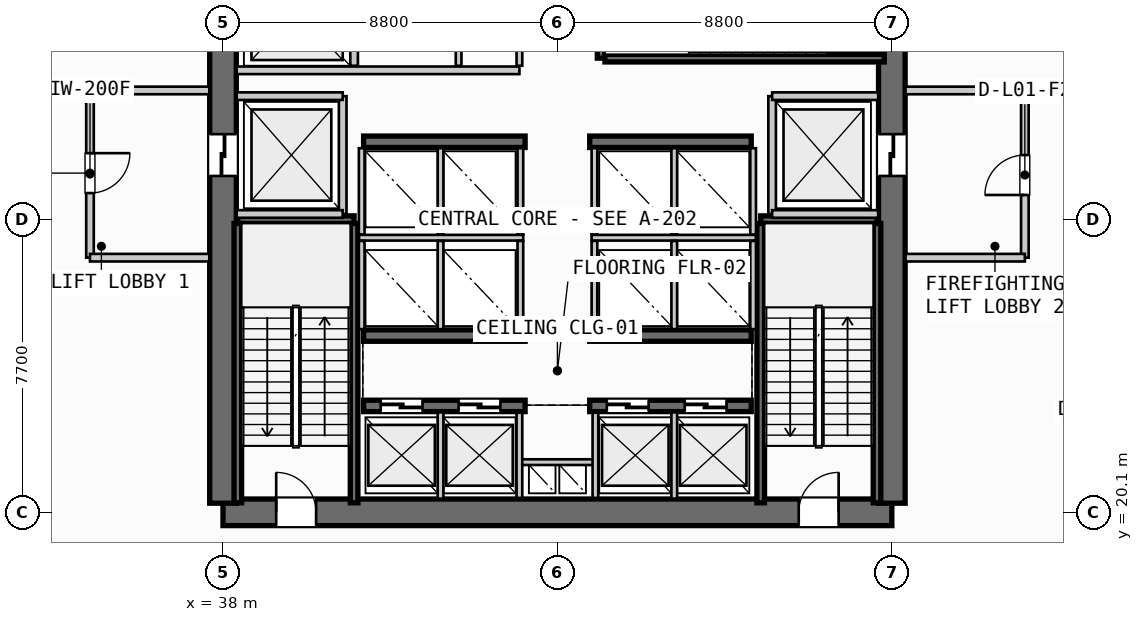
"""IFC4 building model, lengths in metres.
Left out: names, types, materials, properties, quantities, classifications, styles, units other than length and angle.
Written with IfcOpenShell. Run it as: python <this file> out.ifc"""

import sys

from ifc_helpers import new_model, si_unit, direction, frame, frame_2d, origin, place, context, subcontext, project, spatial, rectangle, extrude, source, transform, mapped, element, fill, save


model = new_model("IFC4")
c1 = context("Model", 3, precision=1e-05, world=origin(), true_north=direction((0.0, 1.0)))
c2 = subcontext(c1, "Body", "Model", "MODEL_VIEW")
j1 = project(units=[si_unit("LENGTHUNIT", "METRE"), si_unit("PLANEANGLEUNIT", "RADIAN")], contexts=[c1])
p1 = place(None, origin())
s1 = spatial("IfcSite", under=j1, at=p1, CompositionType="ELEMENT")
p2 = place(p1, origin())
s2 = spatial("IfcBuilding", under=s1, at=p2, CompositionType="ELEMENT")
p3 = place(p2, frame((0.0, 0.0, 5.2)))
s3 = spatial("IfcBuildingStorey", under=s2, at=p3, CompositionType="ELEMENT", Elevation=5.2)
p4 = place(p3, frame((38.0, 20.1, 0.0), z_axis=(0.0, 0.0, 1.0), x_axis=(1.0, 0.0, 0.0)))
e1 = element("IfcWall", 1, at=p4, inside=s3, PredefinedType="SHEAR", context=c2, shape_type="SweptSolid", body=[
    extrude(rectangle(XDim=17.6, YDim=0.7, at=frame_2d((8.8, 0.0))), origin(), (0.0, 0.0, 1.0), 4.55),
])
p5 = place(p4, frame((1.4, 0.0, 0.0)))
e2 = element("IfcOpeningElement", 2, at=p5, cuts=e1, PredefinedType="OPENING", context=c2, shape_type="SweptSolid", body=[
    extrude(rectangle(XDim=1.05, YDim=2.15, at=frame_2d((0.525, 1.075))), frame((0.0, 0.36, 0.0), z_axis=(0.0, -1.0, 0.0), x_axis=(1.0, 0.0, 0.0)), (0.0, 0.0, 1.0), 0.72),
])
p6 = place(p4, frame((15.15, 0.0, 0.0)))
e3 = element("IfcOpeningElement", 3, at=p6, cuts=e1, PredefinedType="OPENING", context=c2, shape_type="SweptSolid", body=[
    extrude(rectangle(XDim=1.05, YDim=2.15, at=frame_2d((0.525, 1.075))), frame((0.0, 0.36, 0.0), z_axis=(0.0, -1.0, 0.0), x_axis=(1.0, 0.0, 0.0)), (0.0, 0.0, 1.0), 0.72),
])
p7 = place(p3, frame((38.0, 35.26, 0.0), z_axis=(0.0, 0.0, 1.0), x_axis=(0.0, -1.0, 0.0)))
e4 = element("IfcWall", 4, at=p7, inside=s3, PredefinedType="SHEAR", context=c2, shape_type="SweptSolid", body=[
    extrude(rectangle(XDim=14.92, YDim=0.7, at=frame_2d((7.46, 0.0))), origin(), (0.0, 0.0, 1.0), 4.55),
])
p8 = place(p7, frame((5.21, 0.0, 0.0)))
e5 = element("IfcOpeningElement", 5, at=p8, cuts=e4, PredefinedType="OPENING", context=c2, shape_type="SweptSolid", body=[
    extrude(rectangle(XDim=1.1, YDim=2.2, at=frame_2d((0.55, 1.1))), frame((0.0, 0.36, 0.0), z_axis=(0.0, -1.0, 0.0), x_axis=(1.0, 0.0, 0.0)), (0.0, 0.0, 1.0), 0.72),
])
p9 = place(p3, frame((55.6, 20.34, 0.0), z_axis=(0.0, 0.0, 1.0), x_axis=(0.0, 1.0, 0.0)))
e6 = element("IfcWall", 6, at=p9, inside=s3, PredefinedType="SHEAR", context=c2, shape_type="SweptSolid", body=[
    extrude(rectangle(XDim=14.92, YDim=0.7, at=frame_2d((7.46, 0.0))), origin(), (0.0, 0.0, 1.0), 4.55),
])
p10 = place(p9, frame((12.71, 0.0, 0.0)))
e7 = element("IfcOpeningElement", 7, at=p10, cuts=e6, PredefinedType="OPENING", context=c2, shape_type="SweptSolid", body=[
    extrude(rectangle(XDim=1.05, YDim=2.15, at=frame_2d((0.525, 1.075))), frame((0.0, 0.36, 0.0), z_axis=(0.0, -1.0, 0.0), x_axis=(1.0, 0.0, 0.0)), (0.0, 0.0, 1.0), 0.72),
])
p11 = place(p9, frame((8.61, 0.0, 0.0)))
e8 = element("IfcOpeningElement", 8, at=p11, cuts=e6, PredefinedType="OPENING", context=c2, shape_type="SweptSolid", body=[
    extrude(rectangle(XDim=1.1, YDim=2.2, at=frame_2d((0.55, 1.1))), frame((0.0, 0.36, 0.0), z_axis=(0.0, -1.0, 0.0), x_axis=(1.0, 0.0, 0.0)), (0.0, 0.0, 1.0), 0.72),
])
p12 = place(p3, frame((41.7, 22.9, 0.0), z_axis=(0.0, 0.0, 1.0), x_axis=(1.0, 0.0, 0.0)))
e9 = element("IfcWall", 9, at=p12, inside=s3, PredefinedType="SHEAR", context=c2, shape_type="SweptSolid", body=[
    extrude(rectangle(XDim=4.25, YDim=0.3, at=frame_2d((2.125, 0.0))), origin(), (0.0, 0.0, 1.0), 4.55),
])
p13 = place(p12, frame((0.45, 0.0, 0.0)))
e10 = element("IfcOpeningElement", 10, at=p13, cuts=e9, PredefinedType="OPENING", context=c2, shape_type="SweptSolid", body=[
    extrude(rectangle(XDim=1.1, YDim=2.2, at=frame_2d((0.55, 1.1))), frame((0.0, 0.16, 0.0), z_axis=(0.0, -1.0, 0.0), x_axis=(1.0, 0.0, 0.0)), (0.0, 0.0, 1.0), 0.32),
])
p14 = place(p12, frame((2.5, 0.0, 0.0)))
e11 = element("IfcOpeningElement", 11, at=p14, cuts=e9, PredefinedType="OPENING", context=c2, shape_type="SweptSolid", body=[
    extrude(rectangle(XDim=1.1, YDim=2.2, at=frame_2d((0.55, 1.1))), frame((0.0, 0.16, 0.0), z_axis=(0.0, -1.0, 0.0), x_axis=(1.0, 0.0, 0.0)), (0.0, 0.0, 1.0), 0.32),
])
p15 = place(p3, frame((47.65, 22.9, 0.0), z_axis=(0.0, 0.0, 1.0), x_axis=(1.0, 0.0, 0.0)))
e12 = element("IfcWall", 12, at=p15, inside=s3, PredefinedType="SHEAR", context=c2, shape_type="SweptSolid", body=[
    extrude(rectangle(XDim=4.25, YDim=0.3, at=frame_2d((2.125, 0.0))), origin(), (0.0, 0.0, 1.0), 4.55),
])
p16 = place(p15, frame((0.45, 0.0, 0.0)))
e13 = element("IfcOpeningElement", 13, at=p16, cuts=e12, PredefinedType="OPENING", context=c2, shape_type="SweptSolid", body=[
    extrude(rectangle(XDim=1.1, YDim=2.2, at=frame_2d((0.55, 1.1))), frame((0.0, 0.16, 0.0), z_axis=(0.0, -1.0, 0.0), x_axis=(1.0, 0.0, 0.0)), (0.0, 0.0, 1.0), 0.32),
])
p17 = place(p15, frame((2.5, 0.0, 0.0)))
e14 = element("IfcOpeningElement", 14, at=p17, cuts=e12, PredefinedType="OPENING", context=c2, shape_type="SweptSolid", body=[
    extrude(rectangle(XDim=1.1, YDim=2.2, at=frame_2d((0.55, 1.1))), frame((0.0, 0.16, 0.0), z_axis=(0.0, -1.0, 0.0), x_axis=(1.0, 0.0, 0.0)), (0.0, 0.0, 1.0), 0.32),
])
for number, where, z_axis, x_axis in (
    (15, (41.7, 24.75, 0.0), (0.0, 0.0, 1.0), (1.0, 0.0, 0.0)),
    (16, (47.65, 24.75, 0.0), (0.0, 0.0, 1.0), (1.0, 0.0, 0.0)),
    (17, (41.7, 29.85, 0.0), (0.0, 0.0, 1.0), (1.0, 0.0, 0.0)),
    (18, (47.65, 29.85, 0.0), (0.0, 0.0, 1.0), (1.0, 0.0, 0.0)),
):
    element("IfcWall", number, at=place(p3, frame(where, z_axis=z_axis, x_axis=x_axis)), inside=s3, PredefinedType="SHEAR", context=c2, shape_type="SweptSolid", body=[
        extrude(rectangle(XDim=4.25, YDim=0.3, at=frame_2d((2.125, 0.0))), origin(), (0.0, 0.0, 1.0), 4.55),
    ])
p18 = place(p3, frame((38.39, 27.8, 0.0), z_axis=(0.0, 0.0, 1.0), x_axis=(1.0, 0.0, 0.0)))
e19 = element("IfcWall", 19, at=p18, inside=s3, PredefinedType="SHEAR", context=c2, shape_type="SweptSolid", body=[
    extrude(rectangle(XDim=3.06, YDim=0.2, at=frame_2d((1.53, 0.0))), origin(), (0.0, 0.0, 1.0), 4.55),
])
for number, where, z_axis, x_axis in (
    (20, (41.45, 27.7, 0.0), (0.0, 0.0, 1.0), (0.0, -1.0, 0.0)),
    (21, (38.39, 20.35, 0.0), (0.0, 0.0, 1.0), (0.0, 1.0, 0.0)),
):
    element("IfcWall", number, at=place(p3, frame(where, z_axis=z_axis, x_axis=x_axis)), inside=s3, PredefinedType="SHEAR", context=c2, shape_type="SweptSolid", body=[
        extrude(rectangle(XDim=7.35, YDim=0.2, at=frame_2d((3.675, 0.0))), origin(), (0.0, 0.0, 1.0), 4.55),
    ])
p19 = place(p3, frame((52.15, 27.8, 0.0), z_axis=(0.0, 0.0, 1.0), x_axis=(1.0, 0.0, 0.0)))
e22 = element("IfcWall", 22, at=p19, inside=s3, PredefinedType="SHEAR", context=c2, shape_type="SweptSolid", body=[
    extrude(rectangle(XDim=3.06, YDim=0.2, at=frame_2d((1.53, 0.0))), origin(), (0.0, 0.0, 1.0), 4.55),
])
for number, where, z_axis, x_axis in (
    (23, (55.21, 27.7, 0.0), (0.0, 0.0, 1.0), (0.0, -1.0, 0.0)),
    (24, (52.15, 20.35, 0.0), (0.0, 0.0, 1.0), (0.0, 1.0, 0.0)),
):
    element("IfcWall", number, at=place(p3, frame(where, z_axis=z_axis, x_axis=x_axis)), inside=s3, PredefinedType="SHEAR", context=c2, shape_type="SweptSolid", body=[
        extrude(rectangle(XDim=7.35, YDim=0.2, at=frame_2d((3.675, 0.0))), origin(), (0.0, 0.0, 1.0), 4.55),
    ])
p20 = place(p3, frame((47.95, 32.05, 0.0), z_axis=(0.0, 0.0, 1.0), x_axis=(0.0, 1.0, 0.0)))
e25 = element("IfcWall", 25, at=p20, inside=s3, PredefinedType="SHEAR", context=c2, shape_type="SweptSolid", body=[
    extrude(rectangle(XDim=3.06, YDim=0.2, at=frame_2d((1.53, 0.0))), origin(), (0.0, 0.0, 1.0), 4.55),
])
p21 = place(p3, frame((55.4, 32.05, 0.0), z_axis=(0.0, 0.0, 1.0), x_axis=(-1.0, 0.0, 0.0)))
e26 = element("IfcWall", 26, at=p21, inside=s3, PredefinedType="SHEAR", context=c2, shape_type="SweptSolid", body=[
    extrude(rectangle(XDim=7.35, YDim=0.2, at=frame_2d((3.675, 0.0))), origin(), (0.0, 0.0, 1.0), 4.55),
])
p22 = place(p3, frame((45.8, 21.42, 0.0), z_axis=(0.0, 0.0, 1.0), x_axis=(1.0, 0.0, 0.0)))
e27 = element("IfcWall", 27, at=p22, inside=s3, PredefinedType="PARTITIONING", context=c2, shape_type="SweptSolid", body=[
    extrude(rectangle(XDim=2.0, YDim=0.15, at=frame_2d((1.0, 0.0))), origin(), (0.0, 0.0, 1.0), 3.763),
])
for number, where, z_axis, x_axis in (
    (28, (45.8, 20.48, 0.0), (0.0, 0.0, 1.0), (0.0, 1.0, 0.0)),
    (29, (47.8, 20.48, 0.0), (0.0, 0.0, 1.0), (0.0, 1.0, 0.0)),
):
    element("IfcWall", number, at=place(p3, frame(where, z_axis=z_axis, x_axis=x_axis)), inside=s3, PredefinedType="PARTITIONING", context=c2, shape_type="SweptSolid", body=[
        extrude(rectangle(XDim=2.24, YDim=0.15, at=frame_2d((1.12, 0.0))), origin(), (0.0, 0.0, 1.0), 3.763),
    ])
p23 = place(p3, frame((41.15, 27.95, 0.0), z_axis=(0.0, 0.0, 1.0), x_axis=(0.0, 1.0, 0.0)))
e30 = element("IfcWall", 30, at=p23, inside=s3, PredefinedType="PARTITIONING", context=c2, shape_type="SweptSolid", body=[
    extrude(rectangle(XDim=3.1, YDim=0.2, at=frame_2d((1.55, 0.0))), origin(), (0.0, 0.0, 1.0), 3.763),
])
for number, where, z_axis, x_axis in (
    (31, (38.36, 27.95, 0.0), (0.0, 0.0, 1.0), (1.0, 0.0, 0.0)),
    (32, (38.36, 31.05, 0.0), (0.0, 0.0, 1.0), (1.0, 0.0, 0.0)),
):
    element("IfcWall", number, at=place(p3, frame(where, z_axis=z_axis, x_axis=x_axis)), inside=s3, PredefinedType="PARTITIONING", context=c2, shape_type="SweptSolid", body=[
        extrude(rectangle(XDim=2.79, YDim=0.2, at=frame_2d((1.395, 0.0))), origin(), (0.0, 0.0, 1.0), 3.763),
    ])
p24 = place(p3, frame((34.5, 31.2, 0.0), z_axis=(0.0, 0.0, 1.0), x_axis=(0.0, -1.0, 0.0)))
e33 = element("IfcWall", 33, at=p24, inside=s3, PredefinedType="PARTITIONING", context=c2, shape_type="SweptSolid", body=[
    extrude(rectangle(XDim=4.4, YDim=0.2, at=frame_2d((2.2, 0.0))), origin(), (0.0, 0.0, 1.0), 3.763),
])
p25 = place(p24, frame((1.65, 0.0, 0.0)))
e34 = element("IfcOpeningElement", 34, at=p25, cuts=e33, PredefinedType="OPENING", context=c2, shape_type="SweptSolid", body=[
    extrude(rectangle(XDim=1.05, YDim=2.15, at=frame_2d((0.525, 1.075))), frame((0.0, 0.11, 0.0), z_axis=(0.0, -1.0, 0.0), x_axis=(1.0, 0.0, 0.0)), (0.0, 0.0, 1.0), 0.22),
])
for number, where, z_axis, x_axis in (
    (35, (34.5, 26.8, 0.0), (0.0, 0.0, 1.0), (1.0, 0.0, 0.0)),
    (36, (34.5, 31.2, 0.0), (0.0, 0.0, 1.0), (1.0, 0.0, 0.0)),
):
    element("IfcWall", number, at=place(p3, frame(where, z_axis=z_axis, x_axis=x_axis)), inside=s3, PredefinedType="PARTITIONING", context=c2, shape_type="SweptSolid", body=[
        extrude(rectangle(XDim=3.14, YDim=0.2, at=frame_2d((1.57, 0.0))), origin(), (0.0, 0.0, 1.0), 3.763),
    ])
p26 = place(p3, frame((52.45, 27.95, 0.0), z_axis=(0.0, 0.0, 1.0), x_axis=(0.0, 1.0, 0.0)))
e37 = element("IfcWall", 37, at=p26, inside=s3, PredefinedType="PARTITIONING", context=c2, shape_type="SweptSolid", body=[
    extrude(rectangle(XDim=3.1, YDim=0.2, at=frame_2d((1.55, 0.0))), origin(), (0.0, 0.0, 1.0), 3.763),
])
for number, where, z_axis, x_axis in (
    (38, (52.45, 27.95, 0.0), (0.0, 0.0, 1.0), (1.0, 0.0, 0.0)),
    (39, (52.45, 31.05, 0.0), (0.0, 0.0, 1.0), (1.0, 0.0, 0.0)),
):
    element("IfcWall", number, at=place(p3, frame(where, z_axis=z_axis, x_axis=x_axis)), inside=s3, PredefinedType="PARTITIONING", context=c2, shape_type="SweptSolid", body=[
        extrude(rectangle(XDim=2.79, YDim=0.2, at=frame_2d((1.395, 0.0))), origin(), (0.0, 0.0, 1.0), 3.763),
    ])
p27 = place(p3, frame((59.1, 26.8, 0.0), z_axis=(0.0, 0.0, 1.0), x_axis=(0.0, 1.0, 0.0)))
e40 = element("IfcWall", 40, at=p27, inside=s3, PredefinedType="PARTITIONING", context=c2, shape_type="SweptSolid", body=[
    extrude(rectangle(XDim=4.4, YDim=0.2, at=frame_2d((2.2, 0.0))), origin(), (0.0, 0.0, 1.0), 3.763),
])
p28 = place(p27, frame((1.65, 0.0, 0.0)))
e41 = element("IfcOpeningElement", 41, at=p28, cuts=e40, PredefinedType="OPENING", context=c2, shape_type="SweptSolid", body=[
    extrude(rectangle(XDim=1.05, YDim=2.15, at=frame_2d((0.525, 1.075))), frame((0.0, 0.11, 0.0), z_axis=(0.0, -1.0, 0.0), x_axis=(1.0, 0.0, 0.0)), (0.0, 0.0, 1.0), 0.22),
])
for number, where, z_axis, x_axis in (
    (42, (55.96, 26.8, 0.0), (0.0, 0.0, 1.0), (1.0, 0.0, 0.0)),
    (43, (55.96, 31.2, 0.0), (0.0, 0.0, 1.0), (1.0, 0.0, 0.0)),
):
    element("IfcWall", number, at=place(p3, frame(where, z_axis=z_axis, x_axis=x_axis)), inside=s3, PredefinedType="PARTITIONING", context=c2, shape_type="SweptSolid", body=[
        extrude(rectangle(XDim=3.14, YDim=0.2, at=frame_2d((1.57, 0.0))), origin(), (0.0, 0.0, 1.0), 3.763),
    ])
for number, where, z_axis, x_axis in (
    (44, (43.725, 20.46, 0.0), (0.0, 0.0, 1.0), (0.0, 1.0, 0.0)),
    (45, (49.875, 20.46, 0.0), (0.0, 0.0, 1.0), (0.0, 1.0, 0.0)),
):
    element("IfcWall", number, at=place(p3, frame(where, z_axis=z_axis, x_axis=x_axis)), inside=s3, PredefinedType="PARTITIONING", context=c2, shape_type="SweptSolid", body=[
        extrude(rectangle(XDim=2.27, YDim=0.15, at=frame_2d((1.135, 0.0))), origin(), (0.0, 0.0, 1.0), 3.763),
    ])
p29 = place(p3, frame((41.58, 27.325, 0.0), z_axis=(0.0, 0.0, 1.0), x_axis=(1.0, 0.0, 0.0)))
e46 = element("IfcWall", 46, at=p29, inside=s3, PredefinedType="PARTITIONING", context=c2, shape_type="SweptSolid", body=[
    extrude(rectangle(XDim=4.32, YDim=0.15, at=frame_2d((2.16, 0.0))), origin(), (0.0, 0.0, 1.0), 3.763),
])
p30 = place(p3, frame((47.7, 27.325, 0.0), z_axis=(0.0, 0.0, 1.0), x_axis=(1.0, 0.0, 0.0)))
e47 = element("IfcWall", 47, at=p30, inside=s3, PredefinedType="PARTITIONING", context=c2, shape_type="SweptSolid", body=[
    extrude(rectangle(XDim=4.32, YDim=0.15, at=frame_2d((2.16, 0.0))), origin(), (0.0, 0.0, 1.0), 3.763),
])
for number, where, z_axis, x_axis in (
    (48, (41.65, 24.92, 0.0), (0.0, 0.0, 1.0), (0.0, 1.0, 0.0)),
    (49, (43.725, 24.92, 0.0), (0.0, 0.0, 1.0), (0.0, 1.0, 0.0)),
    (50, (45.825, 24.92, 0.0), (0.0, 0.0, 1.0), (0.0, 1.0, 0.0)),
    (51, (47.775, 24.92, 0.0), (0.0, 0.0, 1.0), (0.0, 1.0, 0.0)),
    (52, (49.875, 24.92, 0.0), (0.0, 0.0, 1.0), (0.0, 1.0, 0.0)),
    (53, (51.95, 24.92, 0.0), (0.0, 0.0, 1.0), (0.0, 1.0, 0.0)),
):
    element("IfcWall", number, at=place(p3, frame(where, z_axis=z_axis, x_axis=x_axis)), inside=s3, PredefinedType="PARTITIONING", context=c2, shape_type="SweptSolid", body=[
        extrude(rectangle(XDim=2.32, YDim=0.15, at=frame_2d((1.16, 0.0))), origin(), (0.0, 0.0, 1.0), 3.763),
    ])
for number, where, z_axis, x_axis in (
    (54, (41.65, 27.41, 0.0), (0.0, 0.0, 1.0), (0.0, 1.0, 0.0)),
    (55, (43.725, 27.41, 0.0), (0.0, 0.0, 1.0), (0.0, 1.0, 0.0)),
    (56, (45.825, 27.41, 0.0), (0.0, 0.0, 1.0), (0.0, 1.0, 0.0)),
    (57, (47.775, 27.41, 0.0), (0.0, 0.0, 1.0), (0.0, 1.0, 0.0)),
    (58, (49.875, 27.41, 0.0), (0.0, 0.0, 1.0), (0.0, 1.0, 0.0)),
    (59, (51.95, 27.41, 0.0), (0.0, 0.0, 1.0), (0.0, 1.0, 0.0)),
):
    element("IfcWall", number, at=place(p3, frame(where, z_axis=z_axis, x_axis=x_axis)), inside=s3, PredefinedType="PARTITIONING", context=c2, shape_type="SweptSolid", body=[
        extrude(rectangle(XDim=2.27, YDim=0.15, at=frame_2d((1.135, 0.0))), origin(), (0.0, 0.0, 1.0), 3.763),
    ])
p31 = place(p3, frame((41.45, 31.85, 0.0), z_axis=(0.0, 0.0, 1.0), x_axis=(0.0, 1.0, 0.0)))
e60 = element("IfcWall", 60, at=p31, inside=s3, PredefinedType="PARTITIONING", context=c2, shape_type="SweptSolid", body=[
    extrude(rectangle(XDim=3.29, YDim=0.2, at=frame_2d((1.645, 0.0))), origin(), (0.0, 0.0, 1.0), 3.763),
])
p32 = place(p3, frame((38.36, 31.73, 0.0), z_axis=(0.0, 0.0, 1.0), x_axis=(1.0, 0.0, 0.0)))
e61 = element("IfcWall", 61, at=p32, inside=s3, PredefinedType="PARTITIONING", context=c2, shape_type="SweptSolid", body=[
    extrude(rectangle(XDim=7.44, YDim=0.2, at=frame_2d((3.72, 0.0))), origin(), (0.0, 0.0, 1.0), 3.763),
])
p33 = place(p3, frame((45.8, 31.85, 0.0), z_axis=(0.0, 0.0, 1.0), x_axis=(0.0, 1.0, 0.0)))
e62 = element("IfcWall", 62, at=p33, inside=s3, PredefinedType="PARTITIONING", context=c2, shape_type="SweptSolid", body=[
    extrude(rectangle(XDim=3.29, YDim=0.15, at=frame_2d((1.645, 0.0))), origin(), (0.0, 0.0, 1.0), 3.763),
])
p34 = place(p3, frame((44.2, 31.85, 0.0), z_axis=(0.0, 0.0, 1.0), x_axis=(0.0, 1.0, 0.0)))
e63 = element("IfcWall", 63, at=p34, inside=s3, PredefinedType="PLUMBINGWALL", context=c2, shape_type="SweptSolid", body=[
    extrude(rectangle(XDim=3.29, YDim=0.15, at=frame_2d((1.645, 0.0))), origin(), (0.0, 0.0, 1.0), 3.763),
])
m1 = source(origin(), c2, "Body", "SweptSolid", [
    extrude(rectangle(XDim=1.05, YDim=2.15, at=frame_2d((0.525, 1.075))), frame((0.0, 0.025, 0.0), z_axis=(0.0, -1.0, 0.0), x_axis=(1.0, 0.0, 0.0)), (0.0, 0.0, 1.0), 0.05),
])
p35 = place(p5, origin())
e64 = element("IfcDoor", 64, at=p35, inside=s3, OperationType="SINGLE_SWING_LEFT", PredefinedType="DOOR", context=c2, shape_type="MappedRepresentation", body=[
    mapped(m1, transform((0.0, 0.0, 0.0), scale=1.0)),
])
fill(e2, e64)
p36 = place(p6, origin())
e65 = element("IfcDoor", 65, at=p36, inside=s3, OperationType="SINGLE_SWING_RIGHT", PredefinedType="DOOR", context=c2, shape_type="MappedRepresentation", body=[
    mapped(m1, transform((0.0, 0.0, 0.0), scale=1.0)),
])
fill(e3, e65)
m2 = source(origin(), c2, "Body", "SweptSolid", [
    extrude(rectangle(XDim=1.1, YDim=2.2, at=frame_2d((0.55, 1.1))), frame((0.0, 0.025, 0.0), z_axis=(0.0, -1.0, 0.0), x_axis=(1.0, 0.0, 0.0)), (0.0, 0.0, 1.0), 0.05),
])
p37 = place(p8, origin())
e66 = element("IfcDoor", 66, at=p37, inside=s3, OperationType="SLIDING_TO_LEFT", PredefinedType="DOOR", context=c2, shape_type="MappedRepresentation", body=[
    mapped(m2, transform((0.0, 0.0, 0.0), scale=1.0)),
])
fill(e5, e66)
p38 = place(p11, origin())
e67 = element("IfcDoor", 67, at=p38, inside=s3, OperationType="SLIDING_TO_RIGHT", PredefinedType="DOOR", context=c2, shape_type="MappedRepresentation", body=[
    mapped(m2, transform((0.0, 0.0, 0.0), scale=1.0)),
])
fill(e8, e67)
p39 = place(p13, origin())
e68 = element("IfcDoor", 68, at=p39, inside=s3, OperationType="SLIDING_TO_LEFT", PredefinedType="DOOR", context=c2, shape_type="MappedRepresentation", body=[
    mapped(m2, transform((0.0, 0.0, 0.0), scale=1.0)),
])
fill(e10, e68)
p40 = place(p14, origin())
e69 = element("IfcDoor", 69, at=p40, inside=s3, OperationType="SLIDING_TO_LEFT", PredefinedType="DOOR", context=c2, shape_type="MappedRepresentation", body=[
    mapped(m2, transform((0.0, 0.0, 0.0), scale=1.0)),
])
fill(e11, e69)
p41 = place(p16, origin())
e70 = element("IfcDoor", 70, at=p41, inside=s3, OperationType="SLIDING_TO_LEFT", PredefinedType="DOOR", context=c2, shape_type="MappedRepresentation", body=[
    mapped(m2, transform((0.0, 0.0, 0.0), scale=1.0)),
])
fill(e13, e70)
p42 = place(p17, origin())
e71 = element("IfcDoor", 71, at=p42, inside=s3, OperationType="SLIDING_TO_LEFT", PredefinedType="DOOR", context=c2, shape_type="MappedRepresentation", body=[
    mapped(m2, transform((0.0, 0.0, 0.0), scale=1.0)),
])
fill(e14, e71)
p43 = place(p25, origin())
e72 = element("IfcDoor", 72, at=p43, inside=s3, OperationType="SINGLE_SWING_LEFT", PredefinedType="DOOR", context=c2, shape_type="MappedRepresentation", body=[
    mapped(m1, transform((0.0, 0.0, 0.0), scale=1.0)),
])
fill(e34, e72)
p44 = place(p28, origin())
e73 = element("IfcDoor", 73, at=p44, inside=s3, OperationType="SINGLE_SWING_LEFT", PredefinedType="DOOR", context=c2, shape_type="MappedRepresentation", body=[
    mapped(m1, transform((0.0, 0.0, 0.0), scale=1.0)),
])
fill(e41, e73)
save(model, sys.argv[1])
